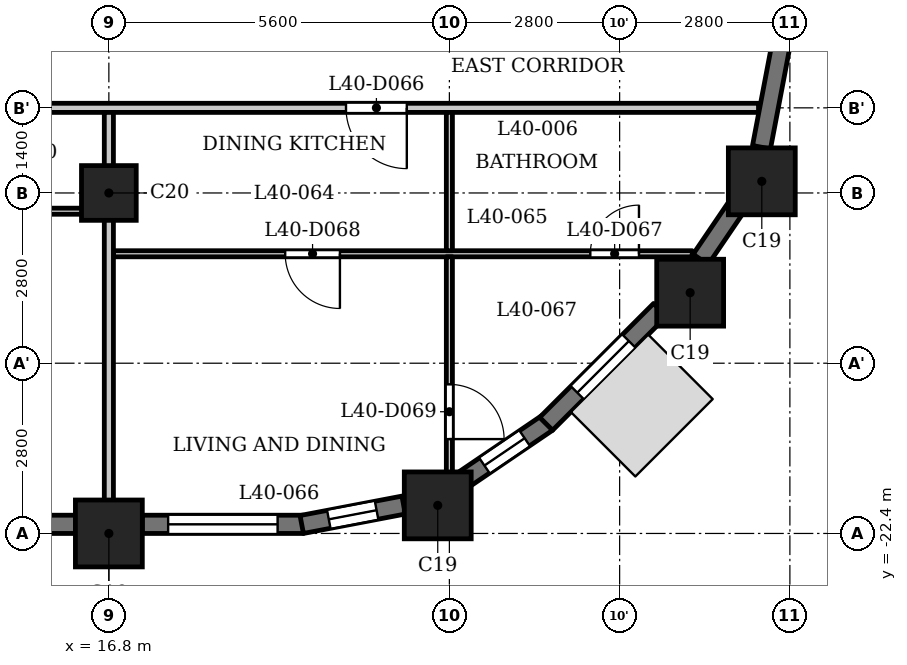
"""IFC4 building model, lengths in metres.
Left out: names, types, materials, properties, quantities, classifications, styles, units other than length and angle.
Written with IfcOpenShell. Run it as: python <this file> out.ifc"""

import sys

from ifc_helpers import new_model, si_unit, direction, frame, frame_2d, origin, origin_2d, place, context, subcontext, project, spatial, rectangle, extrude, element, fill, save


model = new_model("IFC4")
c1 = context("Model", 3, precision=1e-05, world=origin(), true_north=direction((0.0, 1.0)))
c2 = subcontext(c1, "Body", "Model", "MODEL_VIEW")
j1 = project(units=[si_unit("LENGTHUNIT", "METRE"), si_unit("PLANEANGLEUNIT", "RADIAN")], contexts=[c1])
p1 = place(None, origin())
s1 = spatial("IfcSite", under=j1, at=p1, CompositionType="ELEMENT")
p2 = place(p1, origin())
s2 = spatial("IfcBuilding", under=s1, at=p2, CompositionType="ELEMENT")
p3 = place(p2, frame((0.0, 0.0, 157.1)))
s3 = spatial("IfcBuildingStorey", under=s2, at=p3, CompositionType="ELEMENT", Elevation=157.1)
for number, where, z_axis, x_axis in (
    (1, (16.8, -22.4, 0.0), (0.0, 0.0, 1.0), (1.0, 0.0, 0.0)),
    (2, (22.209, -21.938, 0.0), (0.0, 0.0, 1.0), (1.0, 0.0, 0.0)),
    (3, (26.36, -18.44, 0.0), (0.0, 0.0, 1.0), (1.0, 0.0, 0.0)),
    (4, (27.538, -16.609, 0.0), (0.0, 0.0, 1.0), (1.0, 0.0, 0.0)),
):
    element("IfcColumn", number, at=place(p3, frame(where, z_axis=z_axis, x_axis=x_axis)), inside=s3, PredefinedType="COLUMN", context=c2, shape_type="SweptSolid", body=[
        extrude(rectangle(XDim=1.1, YDim=1.1, at=origin_2d()), origin(), (0.0, 0.0, 1.0), 3.5),
    ])
p4 = place(p3, frame((16.8, -16.8, 0.0), z_axis=(0.0, 0.0, 1.0), x_axis=(1.0, 0.0, 0.0)))
e5 = element("IfcColumn", 5, at=p4, inside=s3, PredefinedType="COLUMN", context=c2, shape_type="SweptSolid", body=[
    extrude(rectangle(XDim=0.9, YDim=0.9, at=origin_2d()), origin(), (0.0, 0.0, 1.0), 3.5),
])
p5 = place(p3, frame((11.75, -22.25, 0.0), z_axis=(0.0, 0.0, 1.0), x_axis=(1.0, 0.0, 0.0)))
e6 = element("IfcWall", 6, at=p5, inside=s3, PredefinedType="SOLIDWALL", context=c2, shape_type="SweptSolid", body=[
    extrude(rectangle(XDim=4.5, YDim=0.3, at=frame_2d((2.25, 0.0))), origin(), (0.0, 0.0, 1.0), 2.45),
])
p6 = place(p5, frame((0.45, 0.0, 1.2)))
e7 = element("IfcOpeningElement", 7, at=p6, cuts=e6, PredefinedType="OPENING", context=c2, shape_type="SweptSolid", body=[
    extrude(rectangle(XDim=3.6, YDim=0.95, at=frame_2d((1.8, 0.475))), frame((0.0, 0.16, 0.0), z_axis=(0.0, -1.0, 0.0), x_axis=(1.0, 0.0, 0.0)), (0.0, 0.0, 1.0), 0.32),
])
p7 = place(p3, frame((17.35, -22.25, 0.0), z_axis=(0.0, 0.0, 1.0), x_axis=(1.0, 0.0, 0.0)))
e8 = element("IfcWall", 8, at=p7, inside=s3, PredefinedType="SOLIDWALL", context=c2, shape_type="SweptSolid", body=[
    extrude(rectangle(XDim=2.65, YDim=0.3, at=frame_2d((1.325, 0.0))), origin(), (0.0, 0.0, 1.0), 2.45),
])
p8 = place(p7, frame((0.425, 0.0, 0.9)))
e9 = element("IfcOpeningElement", 9, at=p8, cuts=e8, PredefinedType="OPENING", context=c2, shape_type="SweptSolid", body=[
    extrude(rectangle(XDim=1.8, YDim=1.25, at=frame_2d((0.9, 0.625))), frame((0.0, 0.16, 0.0), z_axis=(0.0, -1.0, 0.0), x_axis=(1.0, 0.0, 0.0)), (0.0, 0.0, 1.0), 0.32),
])
p9 = place(p3, frame((19.972, -22.253, 0.0), z_axis=(0.0, 0.0, 1.0), x_axis=(0.982297206936, 0.187329114784, 0.0)))
e10 = element("IfcWall", 10, at=p9, inside=s3, PredefinedType="SOLIDWALL", context=c2, shape_type="SweptSolid", body=[
    extrude(rectangle(XDim=1.706, YDim=0.3, at=frame_2d((0.853, 0.0))), origin(), (0.0, 0.0, 1.0), 2.45),
])
p10 = place(p9, frame((0.453, 0.0, 0.6)))
e11 = element("IfcOpeningElement", 11, at=p10, cuts=e10, PredefinedType="OPENING", context=c2, shape_type="SweptSolid", body=[
    extrude(rectangle(XDim=0.8, YDim=1.55, at=frame_2d((0.4, 0.775))), frame((0.0, 0.16, 0.0), z_axis=(0.0, -1.0, 0.0), x_axis=(1.0, 0.0, 0.0)), (0.0, 0.0, 1.0), 0.32),
])
p11 = place(p3, frame((22.602, -21.538, 0.0), z_axis=(0.0, 0.0, 1.0), x_axis=(0.827040942766, 0.562141689424, 0.0)))
e12 = element("IfcWall", 12, at=p11, inside=s3, PredefinedType="SOLIDWALL", context=c2, shape_type="SweptSolid", body=[
    extrude(rectangle(XDim=1.706, YDim=0.3, at=frame_2d((0.853, 0.0))), origin(), (0.0, 0.0, 1.0), 2.45),
])
p12 = place(p11, frame((0.453, 0.0, 0.6)))
e13 = element("IfcOpeningElement", 13, at=p12, cuts=e12, PredefinedType="OPENING", context=c2, shape_type="SweptSolid", body=[
    extrude(rectangle(XDim=0.8, YDim=1.55, at=frame_2d((0.4, 0.775))), frame((0.0, 0.16, 0.0), z_axis=(0.0, -1.0, 0.0), x_axis=(1.0, 0.0, 0.0)), (0.0, 0.0, 1.0), 0.32),
])
p13 = place(p3, frame((23.991, -20.597, 0.0), z_axis=(0.0, 0.0, 1.0), x_axis=(0.707106781187, 0.707106781187, 0.0)))
e14 = element("IfcWall", 14, at=p13, inside=s3, PredefinedType="SOLIDWALL", context=c2, shape_type="SweptSolid", body=[
    extrude(rectangle(XDim=2.65, YDim=0.3, at=frame_2d((1.325, 0.0))), origin(), (0.0, 0.0, 1.0), 2.45),
])
p14 = place(p13, frame((0.725, 0.0, 0.6)))
e15 = element("IfcOpeningElement", 15, at=p14, cuts=e14, PredefinedType="OPENING", context=c2, shape_type="SweptSolid", body=[
    extrude(rectangle(XDim=1.2, YDim=1.55, at=frame_2d((0.6, 0.775))), frame((0.0, 0.16, 0.0), z_axis=(0.0, -1.0, 0.0), x_axis=(1.0, 0.0, 0.0)), (0.0, 0.0, 1.0), 0.32),
])
p15 = place(p3, frame((26.532, -17.893, 0.0), z_axis=(0.0, 0.0, 1.0), x_axis=(0.562105419172, 0.82706559458, 0.0)))
e16 = element("IfcWall", 16, at=p15, inside=s3, PredefinedType="SOLIDWALL", context=c2, shape_type="SweptSolid", body=[
    extrude(rectangle(XDim=1.077, YDim=0.3, at=frame_2d((0.539, 0.0))), origin(), (0.0, 0.0, 1.0), 3.2),
])
p16 = place(p3, frame((27.533, -16.048, 0.0), z_axis=(0.0, 0.0, 1.0), x_axis=(0.187302784601, 0.982302227871, 0.0)))
e17 = element("IfcWall", 17, at=p16, inside=s3, PredefinedType="SOLIDWALL", context=c2, shape_type="SweptSolid", body=[
    extrude(rectangle(XDim=1.706, YDim=0.3, at=frame_2d((0.853, 0.0))), origin(), (0.0, 0.0, 1.0), 2.45),
])
p17 = place(p3, frame((16.875, -17.8, 0.0), z_axis=(0.0, 0.0, 1.0), x_axis=(1.0, 0.0, 0.0)))
e18 = element("IfcWall", 18, at=p17, inside=s3, PredefinedType="PARTITIONING", context=c2, shape_type="SweptSolid", body=[
    extrude(rectangle(XDim=9.519, YDim=0.1, at=frame_2d((4.76, 0.0))), origin(), (0.0, 0.0, 1.0), 3.2),
])
p18 = place(p17, frame((7.843, 0.0, 0.0)))
e19 = element("IfcOpeningElement", 19, at=p18, cuts=e18, PredefinedType="OPENING", context=c2, shape_type="SweptSolid", body=[
    extrude(rectangle(XDim=0.8, YDim=2.1, at=frame_2d((0.4, 1.05))), frame((0.0, 0.06, 0.0), z_axis=(0.0, -1.0, 0.0), x_axis=(1.0, 0.0, 0.0)), (0.0, 0.0, 1.0), 0.12),
])
p19 = place(p17, frame((2.825, 0.0, 0.0)))
e20 = element("IfcOpeningElement", 20, at=p19, cuts=e18, PredefinedType="OPENING", context=c2, shape_type="SweptSolid", body=[
    extrude(rectangle(XDim=0.9, YDim=2.1, at=frame_2d((0.45, 1.05))), frame((0.0, 0.06, 0.0), z_axis=(0.0, -1.0, 0.0), x_axis=(1.0, 0.0, 0.0)), (0.0, 0.0, 1.0), 0.12),
])
p20 = place(p3, frame((-16.725, -17.1, 0.0), z_axis=(0.0, 0.0, 1.0), x_axis=(1.0, 0.0, 0.0)))
e21 = element("IfcWall", 21, at=p20, inside=s3, PredefinedType="PARTITIONING", context=c2, shape_type="SweptSolid", body=[
    extrude(rectangle(XDim=33.45, YDim=0.1, at=frame_2d((16.725, 0.0))), origin(), (0.0, 0.0, 1.0), 3.2),
])
p21 = place(p20, frame((0.725, 0.0, 0.0)))
e22 = element("IfcOpeningElement", 22, at=p21, cuts=e21, PredefinedType="OPENING", context=c2, shape_type="SweptSolid", body=[
    extrude(rectangle(XDim=0.8, YDim=2.1, at=frame_2d((0.4, 1.05))), frame((0.0, 0.06, 0.0), z_axis=(0.0, -1.0, 0.0), x_axis=(1.0, 0.0, 0.0)), (0.0, 0.0, 1.0), 0.12),
])
p22 = place(p20, frame((3.175, 0.0, 0.0)))
e23 = element("IfcOpeningElement", 23, at=p22, cuts=e21, PredefinedType="OPENING", context=c2, shape_type="SweptSolid", body=[
    extrude(rectangle(XDim=0.9, YDim=2.1, at=frame_2d((0.45, 1.05))), frame((0.0, 0.06, 0.0), z_axis=(0.0, -1.0, 0.0), x_axis=(1.0, 0.0, 0.0)), (0.0, 0.0, 1.0), 0.12),
])
p23 = place(p20, frame((6.075, 0.0, 0.0)))
e24 = element("IfcOpeningElement", 24, at=p23, cuts=e21, PredefinedType="OPENING", context=c2, shape_type="SweptSolid", body=[
    extrude(rectangle(XDim=0.8, YDim=2.1, at=frame_2d((0.4, 1.05))), frame((0.0, 0.06, 0.0), z_axis=(0.0, -1.0, 0.0), x_axis=(1.0, 0.0, 0.0)), (0.0, 0.0, 1.0), 0.12),
])
p24 = place(p20, frame((9.425, 0.0, 0.0)))
e25 = element("IfcOpeningElement", 25, at=p24, cuts=e21, PredefinedType="OPENING", context=c2, shape_type="SweptSolid", body=[
    extrude(rectangle(XDim=0.9, YDim=2.1, at=frame_2d((0.45, 1.05))), frame((0.0, 0.06, 0.0), z_axis=(0.0, -1.0, 0.0), x_axis=(1.0, 0.0, 0.0)), (0.0, 0.0, 1.0), 0.12),
])
p25 = place(p20, frame((12.675, 0.0, 0.0)))
e26 = element("IfcOpeningElement", 26, at=p25, cuts=e21, PredefinedType="OPENING", context=c2, shape_type="SweptSolid", body=[
    extrude(rectangle(XDim=0.8, YDim=2.1, at=frame_2d((0.4, 1.05))), frame((0.0, 0.06, 0.0), z_axis=(0.0, -1.0, 0.0), x_axis=(1.0, 0.0, 0.0)), (0.0, 0.0, 1.0), 0.12),
])
p26 = place(p20, frame((15.275, 0.0, 0.0)))
e27 = element("IfcOpeningElement", 27, at=p26, cuts=e21, PredefinedType="OPENING", context=c2, shape_type="SweptSolid", body=[
    extrude(rectangle(XDim=0.9, YDim=2.1, at=frame_2d((0.45, 1.05))), frame((0.0, 0.06, 0.0), z_axis=(0.0, -1.0, 0.0), x_axis=(1.0, 0.0, 0.0)), (0.0, 0.0, 1.0), 0.12),
])
p27 = place(p20, frame((20.625, 0.0, 0.0)))
e28 = element("IfcOpeningElement", 28, at=p27, cuts=e21, PredefinedType="OPENING", context=c2, shape_type="SweptSolid", body=[
    extrude(rectangle(XDim=0.8, YDim=2.1, at=frame_2d((0.4, 1.05))), frame((0.0, 0.06, 0.0), z_axis=(0.0, -1.0, 0.0), x_axis=(1.0, 0.0, 0.0)), (0.0, 0.0, 1.0), 0.12),
])
p28 = place(p20, frame((17.375, 0.0, 0.0)))
e29 = element("IfcOpeningElement", 29, at=p28, cuts=e21, PredefinedType="OPENING", context=c2, shape_type="SweptSolid", body=[
    extrude(rectangle(XDim=0.9, YDim=2.1, at=frame_2d((0.45, 1.05))), frame((0.0, 0.06, 0.0), z_axis=(0.0, -1.0, 0.0), x_axis=(1.0, 0.0, 0.0)), (0.0, 0.0, 1.0), 0.12),
])
p29 = place(p20, frame((31.075, 0.0, 0.0)))
e30 = element("IfcOpeningElement", 30, at=p29, cuts=e21, PredefinedType="OPENING", context=c2, shape_type="SweptSolid", body=[
    extrude(rectangle(XDim=0.8, YDim=2.1, at=frame_2d((0.4, 1.05))), frame((0.0, 0.06, 0.0), z_axis=(0.0, -1.0, 0.0), x_axis=(1.0, 0.0, 0.0)), (0.0, 0.0, 1.0), 0.12),
])
p30 = place(p20, frame((29.325, 0.0, 0.0)))
e31 = element("IfcOpeningElement", 31, at=p30, cuts=e21, PredefinedType="OPENING", context=c2, shape_type="SweptSolid", body=[
    extrude(rectangle(XDim=0.9, YDim=2.1, at=frame_2d((0.45, 1.05))), frame((0.0, 0.06, 0.0), z_axis=(0.0, -1.0, 0.0), x_axis=(1.0, 0.0, 0.0)), (0.0, 0.0, 1.0), 0.12),
])
p31 = place(p20, frame((23.725, 0.0, 0.0)))
e32 = element("IfcOpeningElement", 32, at=p31, cuts=e21, PredefinedType="OPENING", context=c2, shape_type="SweptSolid", body=[
    extrude(rectangle(XDim=0.9, YDim=2.1, at=frame_2d((0.45, 1.05))), frame((0.0, 0.06, 0.0), z_axis=(0.0, -1.0, 0.0), x_axis=(1.0, 0.0, 0.0)), (0.0, 0.0, 1.0), 0.12),
])
p32 = place(p20, frame((25.775, 0.0, 0.0)))
e33 = element("IfcOpeningElement", 33, at=p32, cuts=e21, PredefinedType="OPENING", context=c2, shape_type="SweptSolid", body=[
    extrude(rectangle(XDim=0.9, YDim=2.1, at=frame_2d((0.45, 1.05))), frame((0.0, 0.06, 0.0), z_axis=(0.0, -1.0, 0.0), x_axis=(1.0, 0.0, 0.0)), (0.0, 0.0, 1.0), 0.12),
])
p33 = place(p3, frame((14.925, -15.4, 0.0), z_axis=(0.0, 0.0, 1.0), x_axis=(1.0, 0.0, 0.0)))
e34 = element("IfcWall", 34, at=p33, inside=s3, PredefinedType="PARTITIONING", context=c2, shape_type="SweptSolid", body=[
    extrude(rectangle(XDim=12.559, YDim=0.15, at=frame_2d((6.279, 0.0))), origin(), (0.0, 0.0, 1.0), 3.2),
])
p34 = place(p33, frame((5.775, 0.0, 0.0)))
e35 = element("IfcOpeningElement", 35, at=p34, cuts=e34, PredefinedType="OPENING", context=c2, shape_type="SweptSolid", body=[
    extrude(rectangle(XDim=1.0, YDim=2.1, at=frame_2d((0.5, 1.05))), frame((0.0, 0.085, 0.0), z_axis=(0.0, -1.0, 0.0), x_axis=(1.0, 0.0, 0.0)), (0.0, 0.0, 1.0), 0.17),
])
p35 = place(p3, frame((16.8, -22.93, 0.0), z_axis=(0.0, 0.0, 1.0), x_axis=(0.0, 1.0, 0.0)))
e36 = element("IfcWall", 36, at=p35, inside=s3, PredefinedType="PARTITIONING", context=c2, shape_type="SweptSolid", body=[
    extrude(rectangle(XDim=7.455, YDim=0.15, at=frame_2d((3.728, 0.0))), origin(), (0.0, 0.0, 1.0), 3.2),
])
p36 = place(p3, frame((22.4, -21.72, 0.0), z_axis=(0.0, 0.0, 1.0), x_axis=(0.0, 1.0, 0.0)))
e37 = element("IfcWall", 37, at=p36, inside=s3, PredefinedType="PARTITIONING", context=c2, shape_type="SweptSolid", body=[
    extrude(rectangle(XDim=3.87, YDim=0.1, at=frame_2d((1.935, 0.0))), origin(), (0.0, 0.0, 1.0), 3.2),
])
p37 = place(p36, frame((0.872, 0.0, 0.0)))
e38 = element("IfcOpeningElement", 38, at=p37, cuts=e37, PredefinedType="OPENING", context=c2, shape_type="SweptSolid", body=[
    extrude(rectangle(XDim=0.9, YDim=2.1, at=frame_2d((0.45, 1.05))), frame((0.0, 0.06, 0.0), z_axis=(0.0, -1.0, 0.0), x_axis=(1.0, 0.0, 0.0)), (0.0, 0.0, 1.0), 0.12),
])
p38 = place(p3, frame((22.4, -17.75, 0.0), z_axis=(0.0, 0.0, 1.0), x_axis=(0.0, 1.0, 0.0)))
e39 = element("IfcWall", 39, at=p38, inside=s3, PredefinedType="PARTITIONING", context=c2, shape_type="SweptSolid", body=[
    extrude(rectangle(XDim=2.275, YDim=0.1, at=frame_2d((1.137, 0.0))), origin(), (0.0, 0.0, 1.0), 3.2),
])
p39 = place(p34, origin())
e40 = element("IfcDoor", 40, at=p39, inside=s3, OperationType="SINGLE_SWING_RIGHT", PredefinedType="DOOR", context=c2, shape_type="SweptSolid", body=[
    extrude(rectangle(XDim=1.0, YDim=2.1, at=frame_2d((0.5, 1.05))), frame((0.0, 0.025, 0.0), z_axis=(0.0, -1.0, 0.0), x_axis=(1.0, 0.0, 0.0)), (0.0, 0.0, 1.0), 0.05),
])
fill(e35, e40)
p40 = place(p18, origin())
e41 = element("IfcDoor", 41, at=p40, inside=s3, OperationType="SINGLE_SWING_LEFT", PredefinedType="DOOR", context=c2, shape_type="SweptSolid", body=[
    extrude(rectangle(XDim=0.8, YDim=2.1, at=frame_2d((0.4, 1.05))), frame((0.0, 0.025, 0.0), z_axis=(0.0, -1.0, 0.0), x_axis=(1.0, 0.0, 0.0)), (0.0, 0.0, 1.0), 0.05),
])
fill(e19, e41)
p41 = place(p19, origin())
e42 = element("IfcDoor", 42, at=p41, inside=s3, OperationType="SINGLE_SWING_RIGHT", PredefinedType="DOOR", context=c2, shape_type="SweptSolid", body=[
    extrude(rectangle(XDim=0.9, YDim=2.1, at=frame_2d((0.45, 1.05))), frame((0.0, 0.025, 0.0), z_axis=(0.0, -1.0, 0.0), x_axis=(1.0, 0.0, 0.0)), (0.0, 0.0, 1.0), 0.05),
])
fill(e20, e42)
p42 = place(p37, origin())
e43 = element("IfcDoor", 43, at=p42, inside=s3, OperationType="SINGLE_SWING_LEFT", PredefinedType="DOOR", context=c2, shape_type="SweptSolid", body=[
    extrude(rectangle(XDim=0.9, YDim=2.1, at=frame_2d((0.45, 1.05))), frame((0.0, 0.025, 0.0), z_axis=(0.0, -1.0, 0.0), x_axis=(1.0, 0.0, 0.0)), (0.0, 0.0, 1.0), 0.05),
])
fill(e38, e43)
p43 = place(p8, origin())
e44 = element("IfcWindow", 44, at=p43, inside=s3, PartitioningType="SINGLE_PANEL", PredefinedType="WINDOW", context=c2, shape_type="SweptSolid", body=[
    extrude(rectangle(XDim=1.8, YDim=1.25, at=frame_2d((0.9, 0.625))), frame((0.0, 0.03, 0.0), z_axis=(0.0, -1.0, 0.0), x_axis=(1.0, 0.0, 0.0)), (0.0, 0.0, 1.0), 0.06),
])
fill(e9, e44)
p44 = place(p10, origin())
e45 = element("IfcWindow", 45, at=p44, inside=s3, PartitioningType="SINGLE_PANEL", PredefinedType="WINDOW", context=c2, shape_type="SweptSolid", body=[
    extrude(rectangle(XDim=0.8, YDim=1.55, at=frame_2d((0.4, 0.775))), frame((0.0, 0.03, 0.0), z_axis=(0.0, -1.0, 0.0), x_axis=(1.0, 0.0, 0.0)), (0.0, 0.0, 1.0), 0.06),
])
fill(e11, e45)
p45 = place(p12, origin())
e46 = element("IfcWindow", 46, at=p45, inside=s3, PartitioningType="SINGLE_PANEL", PredefinedType="WINDOW", context=c2, shape_type="SweptSolid", body=[
    extrude(rectangle(XDim=0.8, YDim=1.55, at=frame_2d((0.4, 0.775))), frame((0.0, 0.03, 0.0), z_axis=(0.0, -1.0, 0.0), x_axis=(1.0, 0.0, 0.0)), (0.0, 0.0, 1.0), 0.06),
])
fill(e13, e46)
p46 = place(p14, origin())
e47 = element("IfcWindow", 47, at=p46, inside=s3, PartitioningType="SINGLE_PANEL", PredefinedType="WINDOW", context=c2, shape_type="SweptSolid", body=[
    extrude(rectangle(XDim=1.2, YDim=1.55, at=frame_2d((0.6, 0.775))), frame((0.0, 0.03, 0.0), z_axis=(0.0, -1.0, 0.0), x_axis=(1.0, 0.0, 0.0)), (0.0, 0.0, 1.0), 0.06),
])
fill(e15, e47)
save(model, sys.argv[1])
